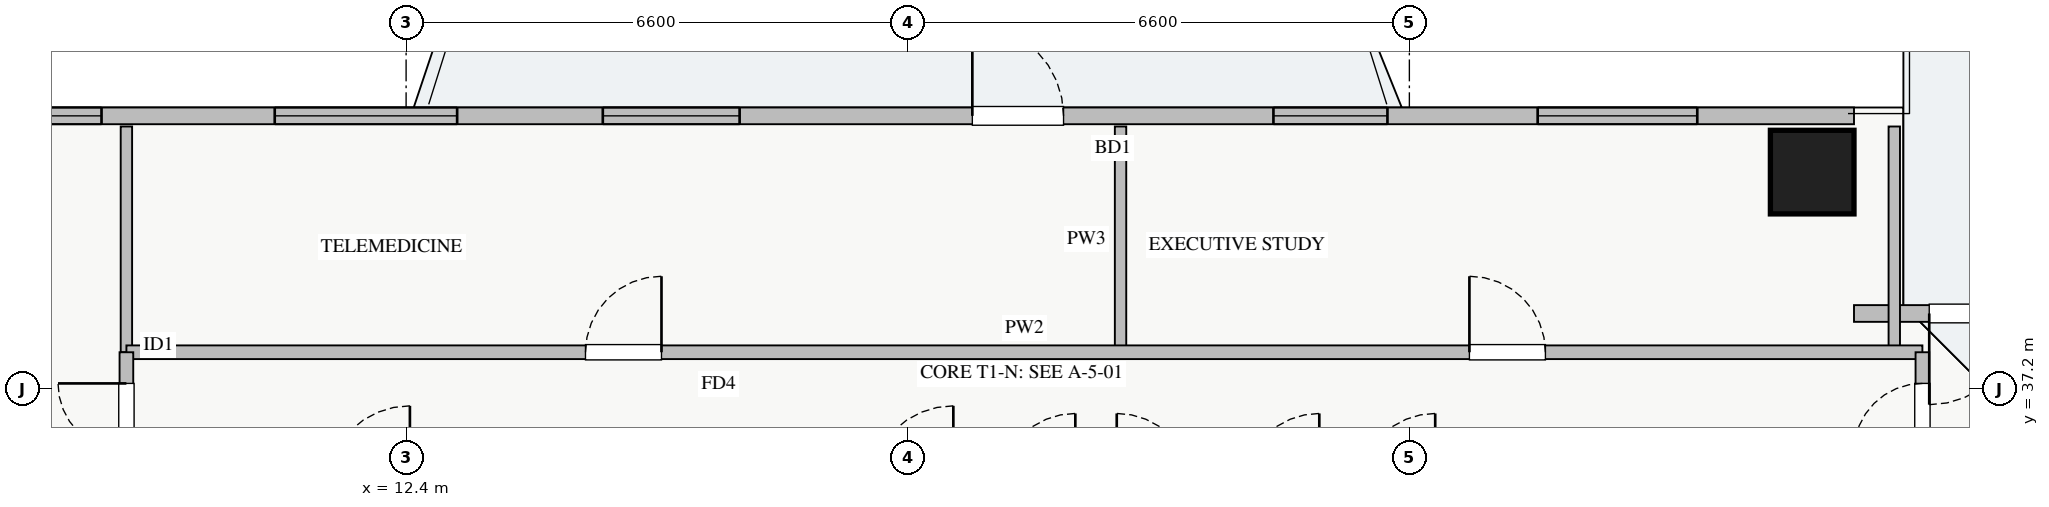
"""IFC4 building model, lengths in metres.
Left out: names, types, materials, properties, quantities, classifications, styles, units other than length and angle.
Written with IfcOpenShell. Run it as: python <this file> out.ifc"""

import sys

from ifc_helpers import new_model, si_unit, direction, frame, frame_2d, origin, origin_2d, place, context, subcontext, project, spatial, rectangle, extrude, source, transform, mapped, element, fill, save


model = new_model("IFC4")
c1 = context("Model", 3, precision=1e-05, world=origin(), true_north=direction((0.0, 1.0)))
c2 = subcontext(c1, "Body", "Model", "MODEL_VIEW")
j1 = project(units=[si_unit("LENGTHUNIT", "METRE"), si_unit("PLANEANGLEUNIT", "RADIAN")], contexts=[c1])
p1 = place(None, origin())
s1 = spatial("IfcSite", under=j1, at=p1, CompositionType="ELEMENT")
p2 = place(p1, origin())
s2 = spatial("IfcBuilding", under=s1, at=p2, CompositionType="ELEMENT")
p3 = place(p2, frame((0.0, 0.0, 123.0)))
s3 = spatial("IfcBuildingStorey", under=s2, at=p3, CompositionType="ELEMENT", Elevation=123.0)
m1 = source(origin(), c2, "Body", "SweptSolid", [
    extrude(rectangle(XDim=1.1, YDim=1.1, at=origin_2d()), origin(), (0.0, 0.0, 1.0), 3.25),
])
p4 = place(p3, frame((30.9, 40.05, 0.0), z_axis=(0.0, 0.0, 1.0), x_axis=(1.0, 0.0, 0.0)))
e1 = element("IfcColumn", 1, at=p4, inside=s3, PredefinedType="COLUMN", context=c2, shape_type="MappedRepresentation", body=[
    mapped(m1, transform((0.0, 0.0, 0.0), x_axis=(1.0, 0.0, 0.0), y_axis=(0.0, 1.0, 0.0), z_axis=(0.0, 0.0, 1.0), scale=1.0)),
])
p5 = place(p3, frame((6.55, 40.79, 0.0), z_axis=(0.0, 0.0, 1.0), x_axis=(1.0, 0.0, 0.0)))
e2 = element("IfcWall", 2, at=p5, inside=s3, PredefinedType="STANDARD", context=c2, shape_type="SweptSolid", body=[
    extrude(rectangle(XDim=24.9, YDim=0.22, at=frame_2d((12.45, 0.0))), origin(), (0.0, 0.0, 1.0), 2.61),
])
p6 = place(p5, frame((13.3, 0.0, 0.0)))
e3 = element("IfcOpeningElement", 3, at=p6, cuts=e2, PredefinedType="OPENING", context=c2, shape_type="SweptSolid", body=[
    extrude(rectangle(XDim=1.2, YDim=2.1, at=frame_2d((0.6, 1.05))), frame((0.0, 0.12, 0.0), z_axis=(0.0, -1.0, 0.0), x_axis=(1.0, 0.0, 0.0)), (0.0, 0.0, 1.0), 0.24),
])
p7 = place(p5, frame((0.343, 0.0, 0.9)))
e4 = element("IfcOpeningElement", 4, at=p7, cuts=e2, PredefinedType="OPENING", context=c2, shape_type="SweptSolid", body=[
    extrude(rectangle(XDim=1.5, YDim=1.5, at=frame_2d((0.75, 0.75))), frame((0.0, 0.12, 0.0), z_axis=(0.0, -1.0, 0.0), x_axis=(1.0, 0.0, 0.0)), (0.0, 0.0, 1.0), 0.24),
])
p8 = place(p5, frame((8.438, 0.0, 0.9)))
e5 = element("IfcOpeningElement", 5, at=p8, cuts=e2, PredefinedType="OPENING", context=c2, shape_type="SweptSolid", body=[
    extrude(rectangle(XDim=1.8, YDim=1.45, at=frame_2d((0.9, 0.725))), frame((0.0, 0.12, 0.0), z_axis=(0.0, -1.0, 0.0), x_axis=(1.0, 0.0, 0.0)), (0.0, 0.0, 1.0), 0.24),
])
p9 = place(p5, frame((17.261, 0.0, 0.9)))
e6 = element("IfcOpeningElement", 6, at=p9, cuts=e2, PredefinedType="OPENING", context=c2, shape_type="SweptSolid", body=[
    extrude(rectangle(XDim=1.5, YDim=1.5, at=frame_2d((0.75, 0.75))), frame((0.0, 0.12, 0.0), z_axis=(0.0, -1.0, 0.0), x_axis=(1.0, 0.0, 0.0)), (0.0, 0.0, 1.0), 0.24),
])
p10 = place(p5, frame((20.738, 0.0, 0.9)))
e7 = element("IfcOpeningElement", 7, at=p10, cuts=e2, PredefinedType="OPENING", context=c2, shape_type="SweptSolid", body=[
    extrude(rectangle(XDim=2.1, YDim=1.48, at=frame_2d((1.05, 0.74))), frame((0.0, 0.12, 0.0), z_axis=(0.0, -1.0, 0.0), x_axis=(1.0, 0.0, 0.0)), (0.0, 0.0, 1.0), 0.24),
])
p11 = place(p5, frame((4.122, 0.0, 0.9)))
e8 = element("IfcOpeningElement", 8, at=p11, cuts=e2, PredefinedType="OPENING", context=c2, shape_type="SweptSolid", body=[
    extrude(rectangle(XDim=2.4, YDim=1.5, at=frame_2d((1.2, 0.75))), frame((0.0, 0.12, 0.0), z_axis=(0.0, -1.0, 0.0), x_axis=(1.0, 0.0, 0.0)), (0.0, 0.0, 1.0), 0.24),
])
p12 = place(p3, frame((31.45, 38.19, 0.0), z_axis=(0.0, 0.0, 1.0), x_axis=(1.0, 0.0, 0.0)))
e9 = element("IfcWall", 9, at=p12, inside=s3, PredefinedType="STANDARD", context=c2, shape_type="SweptSolid", body=[
    extrude(rectangle(XDim=2.74, YDim=0.22, at=frame_2d((1.37, 0.0))), origin(), (0.0, 0.0, 1.0), 2.61),
])
p13 = place(p12, frame((0.99, 0.0, 0.0)))
e10 = element("IfcOpeningElement", 10, at=p13, cuts=e9, PredefinedType="OPENING", context=c2, shape_type="SweptSolid", body=[
    extrude(rectangle(XDim=1.2, YDim=2.1, at=frame_2d((0.6, 1.05))), frame((0.0, 0.12, 0.0), z_axis=(0.0, -1.0, 0.0), x_axis=(1.0, 0.0, 0.0)), (0.0, 0.0, 1.0), 0.24),
])
for number, where, z_axis, x_axis in (
    (11, (21.8, 37.68, 0.0), (0.0, 0.0, 1.0), (0.0, 1.0, 0.0)),
    (12, (8.72, 37.68, 0.0), (0.0, 0.0, 1.0), (0.0, 1.0, 0.0)),
    (13, (31.98, 37.68, 0.0), (0.0, 0.0, 1.0), (0.0, 1.0, 0.0)),
):
    element("IfcWall", number, at=place(p3, frame(where, z_axis=z_axis, x_axis=x_axis)), inside=s3, PredefinedType="PARTITIONING", context=c2, shape_type="SweptSolid", body=[
        extrude(rectangle(XDim=2.97, YDim=0.15, at=frame_2d((1.485, 0.0))), origin(), (0.0, 0.0, 1.0), 3.07),
    ])
p14 = place(p3, frame((8.72, 37.68, 0.0), z_axis=(0.0, 0.0, 1.0), x_axis=(1.0, 0.0, 0.0)))
e14 = element("IfcWall", 14, at=p14, inside=s3, PredefinedType="PARTITIONING", context=c2, shape_type="SweptSolid", body=[
    extrude(rectangle(XDim=23.63, YDim=0.18, at=frame_2d((11.815, 0.0))), origin(), (0.0, 0.0, 1.0), 3.07),
])
p15 = place(p14, frame((6.04, 0.0, 0.0)))
e15 = element("IfcOpeningElement", 15, at=p15, cuts=e14, PredefinedType="OPENING", context=c2, shape_type="SweptSolid", body=[
    extrude(rectangle(XDim=1.0, YDim=2.05, at=frame_2d((0.5, 1.025))), frame((0.0, 0.1, 0.0), z_axis=(0.0, -1.0, 0.0), x_axis=(1.0, 0.0, 0.0)), (0.0, 0.0, 1.0), 0.2),
])
p16 = place(p14, frame((17.67, 0.0, 0.0)))
e16 = element("IfcOpeningElement", 16, at=p16, cuts=e14, PredefinedType="OPENING", context=c2, shape_type="SweptSolid", body=[
    extrude(rectangle(XDim=1.0, YDim=2.05, at=frame_2d((0.5, 1.025))), frame((0.0, 0.1, 0.0), z_axis=(0.0, -1.0, 0.0), x_axis=(1.0, 0.0, 0.0)), (0.0, 0.0, 1.0), 0.2),
])
p17 = place(p3, frame((8.72, 8.31, 0.0), z_axis=(0.0, 0.0, 1.0), x_axis=(0.0, 1.0, 0.0)))
e17 = element("IfcWall", 17, at=p17, inside=s3, PredefinedType="PARTITIONING", context=c2, shape_type="SweptSolid", body=[
    extrude(rectangle(XDim=29.37, YDim=0.18, at=frame_2d((14.685, 0.0))), origin(), (0.0, 0.0, 1.0), 3.07),
])
p18 = place(p17, frame((28.06, 0.0, 0.0)))
e18 = element("IfcOpeningElement", 18, at=p18, cuts=e17, PredefinedType="OPENING", context=c2, shape_type="SweptSolid", body=[
    extrude(rectangle(XDim=0.9, YDim=2.05, at=frame_2d((0.45, 1.025))), frame((0.0, 0.1, 0.0), z_axis=(0.0, -1.0, 0.0), x_axis=(1.0, 0.0, 0.0)), (0.0, 0.0, 1.0), 0.2),
])
p19 = place(p17, frame((0.24, 0.0, 0.0)))
e19 = element("IfcOpeningElement", 19, at=p19, cuts=e17, PredefinedType="OPENING", context=c2, shape_type="SweptSolid", body=[
    extrude(rectangle(XDim=0.9, YDim=2.05, at=frame_2d((0.45, 1.025))), frame((0.0, 0.1, 0.0), z_axis=(0.0, -1.0, 0.0), x_axis=(1.0, 0.0, 0.0)), (0.0, 0.0, 1.0), 0.2),
])
p20 = place(p17, frame((2.92, 0.0, 0.0)))
e20 = element("IfcOpeningElement", 20, at=p20, cuts=e17, PredefinedType="OPENING", context=c2, shape_type="SweptSolid", body=[
    extrude(rectangle(XDim=1.0, YDim=2.05, at=frame_2d((0.5, 1.025))), frame((0.0, 0.1, 0.0), z_axis=(0.0, -1.0, 0.0), x_axis=(1.0, 0.0, 0.0)), (0.0, 0.0, 1.0), 0.2),
])
p21 = place(p17, frame((14.315, 0.0, 0.0)))
e21 = element("IfcOpeningElement", 21, at=p21, cuts=e17, PredefinedType="OPENING", context=c2, shape_type="SweptSolid", body=[
    extrude(rectangle(XDim=1.0, YDim=2.05, at=frame_2d((0.5, 1.025))), frame((0.0, 0.1, 0.0), z_axis=(0.0, -1.0, 0.0), x_axis=(1.0, 0.0, 0.0)), (0.0, 0.0, 1.0), 0.2),
])
p22 = place(p17, frame((20.315, 0.0, 0.0)))
e22 = element("IfcOpeningElement", 22, at=p22, cuts=e17, PredefinedType="OPENING", context=c2, shape_type="SweptSolid", body=[
    extrude(rectangle(XDim=1.0, YDim=2.05, at=frame_2d((0.5, 1.025))), frame((0.0, 0.1, 0.0), z_axis=(0.0, -1.0, 0.0), x_axis=(1.0, 0.0, 0.0)), (0.0, 0.0, 1.0), 0.2),
])
p23 = place(p3, frame((32.35, 8.31, 0.0), z_axis=(0.0, 0.0, 1.0), x_axis=(0.0, 1.0, 0.0)))
e23 = element("IfcWall", 23, at=p23, inside=s3, PredefinedType="PARTITIONING", context=c2, shape_type="SweptSolid", body=[
    extrude(rectangle(XDim=29.37, YDim=0.18, at=frame_2d((14.685, 0.0))), origin(), (0.0, 0.0, 1.0), 3.07),
])
p24 = place(p23, frame((28.06, 0.0, 0.0)))
e24 = element("IfcOpeningElement", 24, at=p24, cuts=e23, PredefinedType="OPENING", context=c2, shape_type="SweptSolid", body=[
    extrude(rectangle(XDim=0.9, YDim=2.05, at=frame_2d((0.45, 1.025))), frame((0.0, 0.1, 0.0), z_axis=(0.0, -1.0, 0.0), x_axis=(1.0, 0.0, 0.0)), (0.0, 0.0, 1.0), 0.2),
])
p25 = place(p23, frame((0.415, 0.0, 0.0)))
e25 = element("IfcOpeningElement", 25, at=p25, cuts=e23, PredefinedType="OPENING", context=c2, shape_type="SweptSolid", body=[
    extrude(rectangle(XDim=0.9, YDim=2.05, at=frame_2d((0.45, 1.025))), frame((0.0, 0.1, 0.0), z_axis=(0.0, -1.0, 0.0), x_axis=(1.0, 0.0, 0.0)), (0.0, 0.0, 1.0), 0.2),
])
p26 = place(p23, frame((5.295, 0.0, 0.0)))
e26 = element("IfcOpeningElement", 26, at=p26, cuts=e23, PredefinedType="OPENING", context=c2, shape_type="SweptSolid", body=[
    extrude(rectangle(XDim=1.0, YDim=2.05, at=frame_2d((0.5, 1.025))), frame((0.0, 0.1, 0.0), z_axis=(0.0, -1.0, 0.0), x_axis=(1.0, 0.0, 0.0)), (0.0, 0.0, 1.0), 0.2),
])
p27 = place(p23, frame((11.645, 0.0, 0.0)))
e27 = element("IfcOpeningElement", 27, at=p27, cuts=e23, PredefinedType="OPENING", context=c2, shape_type="SweptSolid", body=[
    extrude(rectangle(XDim=1.0, YDim=2.05, at=frame_2d((0.5, 1.025))), frame((0.0, 0.1, 0.0), z_axis=(0.0, -1.0, 0.0), x_axis=(1.0, 0.0, 0.0)), (0.0, 0.0, 1.0), 0.2),
])
p28 = place(p23, frame((20.835, 0.0, 0.0)))
e28 = element("IfcOpeningElement", 28, at=p28, cuts=e23, PredefinedType="OPENING", context=c2, shape_type="SweptSolid", body=[
    extrude(rectangle(XDim=1.0, YDim=2.05, at=frame_2d((0.5, 1.025))), frame((0.0, 0.1, 0.0), z_axis=(0.0, -1.0, 0.0), x_axis=(1.0, 0.0, 0.0)), (0.0, 0.0, 1.0), 0.2),
])
m2 = source(origin(), c2, "Body", "SweptSolid", [
    extrude(rectangle(XDim=1.2, YDim=2.1, at=frame_2d((0.6, 1.05))), frame((0.0, 0.025, 0.0), z_axis=(0.0, -1.0, 0.0), x_axis=(1.0, 0.0, 0.0)), (0.0, 0.0, 1.0), 0.05),
])
p29 = place(p6, origin())
e29 = element("IfcDoor", 29, at=p29, inside=s3, OperationType="SINGLE_SWING_LEFT", PredefinedType="DOOR", context=c2, shape_type="MappedRepresentation", body=[
    mapped(m2, transform((0.0, 0.0, 0.0), x_axis=(1.0, 0.0, 0.0), y_axis=(0.0, 1.0, 0.0), z_axis=(0.0, 0.0, 1.0), scale=1.0)),
])
fill(e3, e29)
m3 = source(origin(), c2, "Body", "SweptSolid", [
    extrude(rectangle(XDim=1.5, YDim=1.5, at=frame_2d((0.75, 0.75))), frame((0.0, 0.03, 0.0), z_axis=(0.0, -1.0, 0.0), x_axis=(1.0, 0.0, 0.0)), (0.0, 0.0, 1.0), 0.06),
])
p30 = place(p7, origin())
e30 = element("IfcWindow", 30, at=p30, inside=s3, PartitioningType="TRIPLE_PANEL_VERTICAL", PredefinedType="WINDOW", context=c2, shape_type="MappedRepresentation", body=[
    mapped(m3, transform((0.0, 0.0, 0.0), x_axis=(1.0, 0.0, 0.0), y_axis=(0.0, 1.0, 0.0), z_axis=(0.0, 0.0, 1.0), scale=1.0)),
])
fill(e4, e30)
m4 = source(origin(), c2, "Body", "SweptSolid", [
    extrude(rectangle(XDim=1.8, YDim=1.45, at=frame_2d((0.9, 0.725))), frame((0.0, 0.03, 0.0), z_axis=(0.0, -1.0, 0.0), x_axis=(1.0, 0.0, 0.0)), (0.0, 0.0, 1.0), 0.06),
])
p31 = place(p8, origin())
e31 = element("IfcWindow", 31, at=p31, inside=s3, PartitioningType="DOUBLE_PANEL_VERTICAL", PredefinedType="WINDOW", context=c2, shape_type="MappedRepresentation", body=[
    mapped(m4, transform((0.0, 0.0, 0.0), x_axis=(1.0, 0.0, 0.0), y_axis=(0.0, 1.0, 0.0), z_axis=(0.0, 0.0, 1.0), scale=1.0)),
])
fill(e5, e31)
p32 = place(p9, origin())
e32 = element("IfcWindow", 32, at=p32, inside=s3, PartitioningType="DOUBLE_PANEL_VERTICAL", PredefinedType="WINDOW", context=c2, shape_type="MappedRepresentation", body=[
    mapped(m3, transform((0.0, 0.0, 0.0), x_axis=(1.0, 0.0, 0.0), y_axis=(0.0, 1.0, 0.0), z_axis=(0.0, 0.0, 1.0), scale=1.0)),
])
fill(e6, e32)
m5 = source(origin(), c2, "Body", "SweptSolid", [
    extrude(rectangle(XDim=2.1, YDim=1.48, at=frame_2d((1.05, 0.74))), frame((0.0, 0.03, 0.0), z_axis=(0.0, -1.0, 0.0), x_axis=(1.0, 0.0, 0.0)), (0.0, 0.0, 1.0), 0.06),
])
p33 = place(p10, origin())
e33 = element("IfcWindow", 33, at=p33, inside=s3, PartitioningType="TRIPLE_PANEL_VERTICAL", PredefinedType="WINDOW", context=c2, shape_type="MappedRepresentation", body=[
    mapped(m5, transform((0.0, 0.0, 0.0), x_axis=(1.0, 0.0, 0.0), y_axis=(0.0, 1.0, 0.0), z_axis=(0.0, 0.0, 1.0), scale=1.0)),
])
fill(e7, e33)
p34 = place(p13, frame((1.2, 0.0, 0.0), z_axis=(0.0, 0.0, 1.0), x_axis=(-1.0, 0.0, 0.0)))
e34 = element("IfcDoor", 34, at=p34, inside=s3, OperationType="SINGLE_SWING_LEFT", PredefinedType="DOOR", context=c2, shape_type="MappedRepresentation", body=[
    mapped(m2, transform((0.0, 0.0, 0.0), x_axis=(1.0, 0.0, 0.0), y_axis=(0.0, 1.0, 0.0), z_axis=(0.0, 0.0, 1.0), scale=1.0)),
])
fill(e10, e34)
m6 = source(origin(), c2, "Body", "SweptSolid", [
    extrude(rectangle(XDim=1.0, YDim=2.05, at=frame_2d((0.5, 1.025))), frame((0.0, 0.025, 0.0), z_axis=(0.0, -1.0, 0.0), x_axis=(1.0, 0.0, 0.0)), (0.0, 0.0, 1.0), 0.05),
])
p35 = place(p15, origin())
e35 = element("IfcDoor", 35, at=p35, inside=s3, OperationType="SINGLE_SWING_RIGHT", PredefinedType="DOOR", context=c2, shape_type="MappedRepresentation", body=[
    mapped(m6, transform((0.0, 0.0, 0.0), x_axis=(1.0, 0.0, 0.0), y_axis=(0.0, 1.0, 0.0), z_axis=(0.0, 0.0, 1.0), scale=1.0)),
])
fill(e15, e35)
p36 = place(p16, origin())
e36 = element("IfcDoor", 36, at=p36, inside=s3, OperationType="SINGLE_SWING_LEFT", PredefinedType="DOOR", context=c2, shape_type="MappedRepresentation", body=[
    mapped(m6, transform((0.0, 0.0, 0.0), x_axis=(1.0, 0.0, 0.0), y_axis=(0.0, 1.0, 0.0), z_axis=(0.0, 0.0, 1.0), scale=1.0)),
])
fill(e16, e36)
m7 = source(origin(), c2, "Body", "SweptSolid", [
    extrude(rectangle(XDim=0.9, YDim=2.05, at=frame_2d((0.45, 1.025))), frame((0.0, 0.025, 0.0), z_axis=(0.0, -1.0, 0.0), x_axis=(1.0, 0.0, 0.0)), (0.0, 0.0, 1.0), 0.05),
])
p37 = place(p18, origin())
e37 = element("IfcDoor", 37, at=p37, inside=s3, OperationType="SINGLE_SWING_RIGHT", PredefinedType="DOOR", context=c2, shape_type="MappedRepresentation", body=[
    mapped(m7, transform((0.0, 0.0, 0.0), x_axis=(1.0, 0.0, 0.0), y_axis=(0.0, 1.0, 0.0), z_axis=(0.0, 0.0, 1.0), scale=1.0)),
])
fill(e18, e37)
p38 = place(p24, origin())
e38 = element("IfcDoor", 38, at=p38, inside=s3, OperationType="SINGLE_SWING_LEFT", PredefinedType="DOOR", context=c2, shape_type="MappedRepresentation", body=[
    mapped(m7, transform((0.0, 0.0, 0.0), x_axis=(1.0, 0.0, 0.0), y_axis=(0.0, 1.0, 0.0), z_axis=(0.0, 0.0, 1.0), scale=1.0)),
])
fill(e24, e38)
m8 = source(origin(), c2, "Body", "SweptSolid", [
    extrude(rectangle(XDim=2.4, YDim=1.5, at=frame_2d((1.2, 0.75))), frame((0.0, 0.03, 0.0), z_axis=(0.0, -1.0, 0.0), x_axis=(1.0, 0.0, 0.0)), (0.0, 0.0, 1.0), 0.06),
])
p39 = place(p11, origin())
e39 = element("IfcWindow", 39, at=p39, inside=s3, PartitioningType="TRIPLE_PANEL_VERTICAL", PredefinedType="WINDOW", context=c2, shape_type="MappedRepresentation", body=[
    mapped(m8, transform((0.0, 0.0, 0.0), x_axis=(1.0, 0.0, 0.0), y_axis=(0.0, 1.0, 0.0), z_axis=(0.0, 0.0, 1.0), scale=1.0)),
])
fill(e8, e39)
save(model, sys.argv[1])
